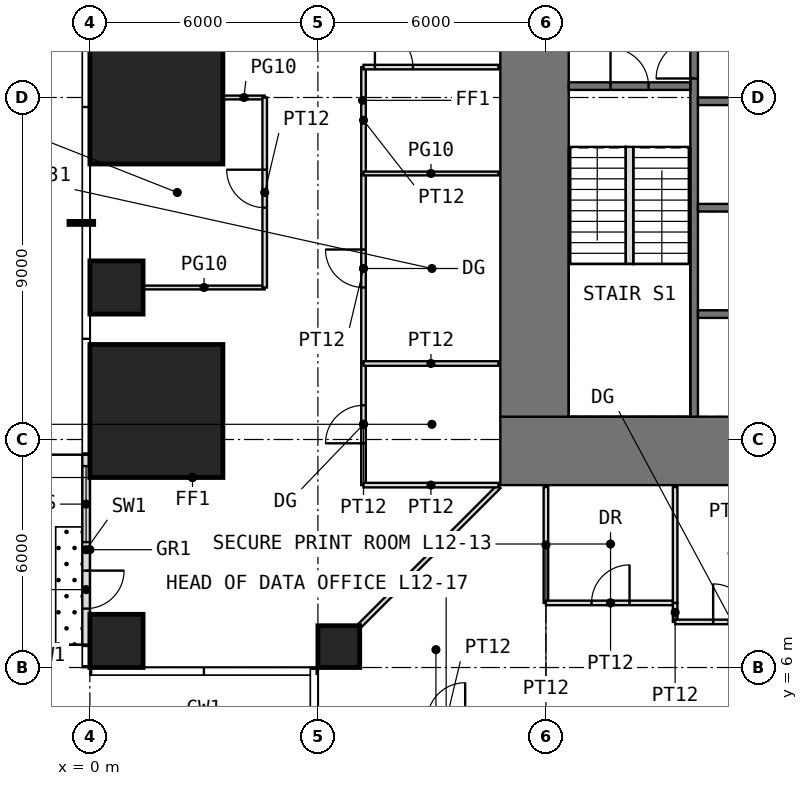
"""IFC4 building model, lengths in metres.
Left out: names, types, materials, properties, quantities, classifications, styles, units other than length and angle.
Written with IfcOpenShell. Run it as: python <this file> out.ifc"""

import sys

from ifc_helpers import new_model, si_unit, direction, frame, frame_2d, origin, origin_2d, place, context, subcontext, project, spatial, rectangle, extrude, element, fill, save


model = new_model("IFC4")
c1 = context("Model", 3, precision=1e-05, world=origin(), true_north=direction((0.0, 1.0)))
c2 = subcontext(c1, "Body", "Model", "MODEL_VIEW")
j1 = project(units=[si_unit("LENGTHUNIT", "METRE"), si_unit("PLANEANGLEUNIT", "RADIAN")], contexts=[c1])
p1 = place(None, origin())
s1 = spatial("IfcSite", under=j1, at=p1, CompositionType="ELEMENT")
p2 = place(p1, origin())
s2 = spatial("IfcBuilding", under=s1, at=p2, CompositionType="ELEMENT")
p3 = place(p2, frame((0.0, 0.0, 54.5)))
s3 = spatial("IfcBuildingStorey", under=s2, at=p3, CompositionType="ELEMENT", Elevation=54.5)
p4 = place(p3, frame((0.7, 6.7, 0.0), z_axis=(0.0, 0.0, 1.0), x_axis=(1.0, 0.0, 0.0)))
e1 = element("IfcColumn", 1, at=p4, inside=s3, PredefinedType="COLUMN", context=c2, shape_type="SweptSolid", body=[
    extrude(rectangle(XDim=1.4, YDim=1.4, at=origin_2d()), origin(), (0.0, 0.0, 1.0), 4.0),
])
p5 = place(p3, frame((6.55, 6.55, 0.0), z_axis=(0.0, 0.0, 1.0), x_axis=(1.0, 0.0, 0.0)))
e2 = element("IfcColumn", 2, at=p5, inside=s3, PredefinedType="COLUMN", context=c2, shape_type="SweptSolid", body=[
    extrude(rectangle(XDim=1.1, YDim=1.1, at=origin_2d()), origin(), (0.0, 0.0, 1.0), 4.0),
])
p6 = place(p3, frame((1.75, 12.75, 0.0), z_axis=(0.0, 0.0, 1.0), x_axis=(1.0, 0.0, 0.0)))
e3 = element("IfcColumn", 3, at=p6, inside=s3, PredefinedType="COLUMN", context=c2, shape_type="SweptSolid", body=[
    extrude(rectangle(XDim=3.5, YDim=3.5, at=origin_2d()), origin(), (0.0, 0.0, 1.0), 4.0),
])
p7 = place(p3, frame((0.7, 16.0, 0.0), z_axis=(0.0, 0.0, 1.0), x_axis=(1.0, 0.0, 0.0)))
e4 = element("IfcColumn", 4, at=p7, inside=s3, PredefinedType="COLUMN", context=c2, shape_type="SweptSolid", body=[
    extrude(rectangle(XDim=1.4, YDim=1.4, at=origin_2d()), origin(), (0.0, 0.0, 1.0), 4.0),
])
p8 = place(p3, frame((1.75, 21.0, 0.0), z_axis=(0.0, 0.0, 1.0), x_axis=(1.0, 0.0, 0.0)))
e5 = element("IfcColumn", 5, at=p8, inside=s3, PredefinedType="COLUMN", context=c2, shape_type="SweptSolid", body=[
    extrude(rectangle(XDim=3.5, YDim=3.5, at=origin_2d()), origin(), (0.0, 0.0, 1.0), 4.0),
])
p9 = place(p3, frame((-0.1, 11.6, 0.0), z_axis=(0.0, 0.0, 1.0), x_axis=(0.0, -1.0, 0.0)))
e6 = element("IfcWall", 6, at=p9, inside=s3, PredefinedType="USERDEFINED", context=c2, shape_type="SweptSolid", body=[
    extrude(rectangle(XDim=5.0, YDim=0.2, at=frame_2d((2.5, 0.0))), origin(), (0.0, 0.0, 1.0), 3.75),
])
p10 = place(p9, frame((3.05, 0.0, 0.0)))
e7 = element("IfcOpeningElement", 7, at=p10, cuts=e6, PredefinedType="OPENING", context=c2, shape_type="SweptSolid", body=[
    extrude(rectangle(XDim=1.0, YDim=2.4, at=frame_2d((0.5, 1.2))), frame((0.0, 0.11, 0.0), z_axis=(0.0, -1.0, 0.0), x_axis=(1.0, 0.0, 0.0)), (0.0, 0.0, 1.0), 0.22),
])
p11 = place(p9, frame((0.3, 0.0, 0.3)))
e8 = element("IfcOpeningElement", 8, at=p11, cuts=e6, PredefinedType="OPENING", context=c2, shape_type="SweptSolid", body=[
    extrude(rectangle(XDim=2.0, YDim=2.7, at=frame_2d((1.0, 1.35))), frame((0.0, 0.11, 0.0), z_axis=(0.0, -1.0, 0.0), x_axis=(1.0, 0.0, 0.0)), (0.0, 0.0, 1.0), 0.22),
])
p12 = place(p3, frame((10.8, 11.7, -0.05), z_axis=(0.0, 0.0, 1.0), x_axis=(1.0, 0.0, 0.0)))
e9 = element("IfcWall", 9, at=p12, inside=s3, PredefinedType="SHEAR", context=c2, shape_type="SweptSolid", body=[
    extrude(rectangle(XDim=20.4, YDim=1.8, at=frame_2d((10.2, 0.0))), origin(), (0.0, 0.0, 1.0), 4.0),
])
p13 = place(p12, frame((9.2, 0.0, 0.05)))
e10 = element("IfcOpeningElement", 10, at=p13, cuts=e9, PredefinedType="OPENING", context=c2, shape_type="SweptSolid", body=[
    extrude(rectangle(XDim=2.0, YDim=2.2, at=frame_2d((1.0, 1.1))), frame((0.0, 0.91, 0.0), z_axis=(0.0, -1.0, 0.0), x_axis=(1.0, 0.0, 0.0)), (0.0, 0.0, 1.0), 1.82),
])
p14 = place(p3, frame((11.7, 12.6, -0.05), z_axis=(0.0, 0.0, 1.0), x_axis=(0.0, 1.0, 0.0)))
e11 = element("IfcWall", 11, at=p14, inside=s3, PredefinedType="SHEAR", context=c2, shape_type="SweptSolid", body=[
    extrude(rectangle(XDim=16.8, YDim=1.8, at=frame_2d((8.4, 0.0))), origin(), (0.0, 0.0, 1.0), 4.0),
])
p15 = place(p14, frame((9.9, 0.0, 0.05)))
e12 = element("IfcOpeningElement", 12, at=p15, cuts=e11, PredefinedType="OPENING", context=c2, shape_type="SweptSolid", body=[
    extrude(rectangle(XDim=1.0, YDim=2.2, at=frame_2d((0.5, 1.1))), frame((0.0, 0.91, 0.0), z_axis=(0.0, -1.0, 0.0), x_axis=(1.0, 0.0, 0.0)), (0.0, 0.0, 1.0), 1.82),
])
p16 = place(p3, frame((15.9, 12.6, -0.05), z_axis=(0.0, 0.0, 1.0), x_axis=(0.0, 1.0, 0.0)))
e13 = element("IfcWall", 13, at=p16, inside=s3, PredefinedType="SHEAR", context=c2, shape_type="SweptSolid", body=[
    extrude(rectangle(XDim=16.8, YDim=0.2, at=frame_2d((8.4, 0.0))), origin(), (0.0, 0.0, 1.0), 4.0),
])
p17 = place(p16, frame((8.9, 0.0, 0.05)))
e14 = element("IfcOpeningElement", 14, at=p17, cuts=e13, PredefinedType="OPENING", context=c2, shape_type="SweptSolid", body=[
    extrude(rectangle(XDim=1.0, YDim=2.2, at=frame_2d((0.5, 1.1))), frame((0.0, 0.11, 0.0), z_axis=(0.0, -1.0, 0.0), x_axis=(1.0, 0.0, 0.0)), (0.0, 0.0, 1.0), 0.22),
])
p18 = place(p3, frame((12.6, 21.3, -0.05), z_axis=(0.0, 0.0, 1.0), x_axis=(1.0, 0.0, 0.0)))
e15 = element("IfcWall", 15, at=p18, inside=s3, PredefinedType="SHEAR", context=c2, shape_type="SweptSolid", body=[
    extrude(rectangle(XDim=3.2, YDim=0.2, at=frame_2d((1.6, 0.0))), origin(), (0.0, 0.0, 1.0), 4.0),
])
p19 = place(p18, frame((1.1, 0.0, 0.05)))
e16 = element("IfcOpeningElement", 16, at=p19, cuts=e15, PredefinedType="OPENING", context=c2, shape_type="SweptSolid", body=[
    extrude(rectangle(XDim=1.0, YDim=2.2, at=frame_2d((0.5, 1.1))), frame((0.0, 0.11, 0.0), z_axis=(0.0, -1.0, 0.0), x_axis=(1.0, 0.0, 0.0)), (0.0, 0.0, 1.0), 0.22),
])
for number, where, z_axis, x_axis in (
    (17, (16.0, 15.3, -0.05), (0.0, 0.0, 1.0), (1.0, 0.0, 0.0)),
    (18, (16.0, 18.1, -0.05), (0.0, 0.0, 1.0), (1.0, 0.0, 0.0)),
    (19, (16.0, 20.9, -0.05), (0.0, 0.0, 1.0), (1.0, 0.0, 0.0)),
):
    element("IfcWall", number, at=place(p3, frame(where, z_axis=z_axis, x_axis=x_axis)), inside=s3, PredefinedType="SHEAR", context=c2, shape_type="SweptSolid", body=[
        extrude(rectangle(XDim=3.2, YDim=0.2, at=frame_2d((1.6, 0.0))), origin(), (0.0, 0.0, 1.0), 4.0),
    ])
p20 = place(p3, frame((1.41, 16.0, 0.0), z_axis=(0.0, 0.0, 1.0), x_axis=(1.0, 0.0, 0.0)))
e20 = element("IfcWall", 20, at=p20, inside=s3, PredefinedType="PARTITIONING", context=c2, shape_type="SweptSolid", body=[
    extrude(rectangle(XDim=3.19, YDim=0.1, at=frame_2d((1.595, 0.0))), origin(), (0.0, 0.0, 1.0), 3.75),
])
p21 = place(p3, frame((3.51, 21.0, 0.0), z_axis=(0.0, 0.0, 1.0), x_axis=(1.0, 0.0, 0.0)))
e21 = element("IfcWall", 21, at=p21, inside=s3, PredefinedType="PARTITIONING", context=c2, shape_type="SweptSolid", body=[
    extrude(rectangle(XDim=1.09, YDim=0.1, at=frame_2d((0.545, 0.0))), origin(), (0.0, 0.0, 1.0), 3.75),
])
p22 = place(p3, frame((4.6, 16.0, 0.0), z_axis=(0.0, 0.0, 1.0), x_axis=(0.0, 1.0, 0.0)))
e22 = element("IfcWall", 22, at=p22, inside=s3, PredefinedType="PARTITIONING", context=c2, shape_type="SweptSolid", body=[
    extrude(rectangle(XDim=5.0, YDim=0.12, at=frame_2d((2.5, 0.0))), origin(), (0.0, 0.0, 1.0), 3.75),
])
p23 = place(p22, frame((2.1, 0.0, 0.0)))
e23 = element("IfcOpeningElement", 23, at=p23, cuts=e22, PredefinedType="OPENING", context=c2, shape_type="SweptSolid", body=[
    extrude(rectangle(XDim=1.0, YDim=2.4, at=frame_2d((0.5, 1.2))), frame((0.0, 0.07, 0.0), z_axis=(0.0, -1.0, 0.0), x_axis=(1.0, 0.0, 0.0)), (0.0, 0.0, 1.0), 0.14),
])
p24 = place(p3, frame((7.11, 7.11, 0.0), z_axis=(0.0, 0.0, 1.0), x_axis=(0.707106781187, 0.707106781187, 0.0)))
e24 = element("IfcWall", 24, at=p24, inside=s3, PredefinedType="PARTITIONING", context=c2, shape_type="SweptSolid", body=[
    extrude(rectangle(XDim=5.168, YDim=0.12, at=frame_2d((2.584, 0.0))), origin(), (0.0, 0.0, 1.0), 3.75),
])
p25 = place(p3, frame((7.2, 10.8, 0.0), z_axis=(0.0, 0.0, 1.0), x_axis=(0.0, 1.0, 0.0)))
e25 = element("IfcWall", 25, at=p25, inside=s3, PredefinedType="PARTITIONING", context=c2, shape_type="SweptSolid", body=[
    extrude(rectangle(XDim=3.2, YDim=0.12, at=frame_2d((1.6, 0.0))), origin(), (0.0, 0.0, 1.0), 3.75),
])
p26 = place(p25, frame((1.1, 0.0, 0.0)))
e26 = element("IfcOpeningElement", 26, at=p26, cuts=e25, PredefinedType="OPENING", context=c2, shape_type="SweptSolid", body=[
    extrude(rectangle(XDim=1.0, YDim=2.4, at=frame_2d((0.5, 1.2))), frame((0.0, 0.07, 0.0), z_axis=(0.0, -1.0, 0.0), x_axis=(1.0, 0.0, 0.0)), (0.0, 0.0, 1.0), 0.14),
])
p27 = place(p3, frame((7.2, 10.8, 0.0), z_axis=(0.0, 0.0, 1.0), x_axis=(1.0, 0.0, 0.0)))
e27 = element("IfcWall", 27, at=p27, inside=s3, PredefinedType="PARTITIONING", context=c2, shape_type="SweptSolid", body=[
    extrude(rectangle(XDim=3.55, YDim=0.12, at=frame_2d((1.775, 0.0))), origin(), (0.0, 0.0, 1.0), 3.75),
])
p28 = place(p3, frame((7.2, 14.0, 0.0), z_axis=(0.0, 0.0, 1.0), x_axis=(0.0, 1.0, 0.0)))
e28 = element("IfcWall", 28, at=p28, inside=s3, PredefinedType="PARTITIONING", context=c2, shape_type="SweptSolid", body=[
    extrude(rectangle(XDim=5.0, YDim=0.12, at=frame_2d((2.5, 0.0))), origin(), (0.0, 0.0, 1.0), 3.75),
])
p29 = place(p28, frame((2.0, 0.0, 0.0)))
e29 = element("IfcOpeningElement", 29, at=p29, cuts=e28, PredefinedType="OPENING", context=c2, shape_type="SweptSolid", body=[
    extrude(rectangle(XDim=1.0, YDim=2.4, at=frame_2d((0.5, 1.2))), frame((0.0, 0.07, 0.0), z_axis=(0.0, -1.0, 0.0), x_axis=(1.0, 0.0, 0.0)), (0.0, 0.0, 1.0), 0.14),
])
p30 = place(p3, frame((7.2, 14.0, 0.0), z_axis=(0.0, 0.0, 1.0), x_axis=(1.0, 0.0, 0.0)))
e30 = element("IfcWall", 30, at=p30, inside=s3, PredefinedType="PARTITIONING", context=c2, shape_type="SweptSolid", body=[
    extrude(rectangle(XDim=3.55, YDim=0.12, at=frame_2d((1.775, 0.0))), origin(), (0.0, 0.0, 1.0), 3.75),
])
p31 = place(p3, frame((7.2, 19.0, 0.0), z_axis=(0.0, 0.0, 1.0), x_axis=(0.0, 1.0, 0.0)))
e31 = element("IfcWall", 31, at=p31, inside=s3, PredefinedType="PARTITIONING", context=c2, shape_type="SweptSolid", body=[
    extrude(rectangle(XDim=2.8, YDim=0.12, at=frame_2d((1.4, 0.0))), origin(), (0.0, 0.0, 1.0), 3.75),
])
p32 = place(p3, frame((7.2, 19.0, 0.0), z_axis=(0.0, 0.0, 1.0), x_axis=(1.0, 0.0, 0.0)))
e32 = element("IfcWall", 32, at=p32, inside=s3, PredefinedType="PARTITIONING", context=c2, shape_type="SweptSolid", body=[
    extrude(rectangle(XDim=3.55, YDim=0.1, at=frame_2d((1.775, 0.0))), origin(), (0.0, 0.0, 1.0), 3.75),
])
p33 = place(p3, frame((7.2, 21.8, 0.0), z_axis=(0.0, 0.0, 1.0), x_axis=(1.0, 0.0, 0.0)))
e33 = element("IfcWall", 33, at=p33, inside=s3, PredefinedType="PARTITIONING", context=c2, shape_type="SweptSolid", body=[
    extrude(rectangle(XDim=3.55, YDim=0.12, at=frame_2d((1.775, 0.0))), origin(), (0.0, 0.0, 1.0), 3.75),
])
p34 = place(p33, frame((0.3, 0.0, 0.0)))
e34 = element("IfcOpeningElement", 34, at=p34, cuts=e33, PredefinedType="OPENING", context=c2, shape_type="SweptSolid", body=[
    extrude(rectangle(XDim=1.0, YDim=2.4, at=frame_2d((0.5, 1.2))), frame((0.0, 0.07, 0.0), z_axis=(0.0, -1.0, 0.0), x_axis=(1.0, 0.0, 0.0)), (0.0, 0.0, 1.0), 0.14),
])
p35 = place(p3, frame((12.0, 7.7, 0.0), z_axis=(0.0, 0.0, 1.0), x_axis=(0.0, 1.0, 0.0)))
e35 = element("IfcWall", 35, at=p35, inside=s3, PredefinedType="PARTITIONING", context=c2, shape_type="SweptSolid", body=[
    extrude(rectangle(XDim=3.05, YDim=0.12, at=frame_2d((1.525, 0.0))), origin(), (0.0, 0.0, 1.0), 3.75),
])
p36 = place(p3, frame((12.0, 7.7, 0.0), z_axis=(0.0, 0.0, 1.0), x_axis=(1.0, 0.0, 0.0)))
e36 = element("IfcWall", 36, at=p36, inside=s3, PredefinedType="PARTITIONING", context=c2, shape_type="SweptSolid", body=[
    extrude(rectangle(XDim=3.4, YDim=0.12, at=frame_2d((1.7, 0.0))), origin(), (0.0, 0.0, 1.0), 3.75),
])
p37 = place(p36, frame((1.2, 0.0, 0.0)))
e37 = element("IfcOpeningElement", 37, at=p37, cuts=e36, PredefinedType="OPENING", context=c2, shape_type="SweptSolid", body=[
    extrude(rectangle(XDim=1.0, YDim=2.2, at=frame_2d((0.5, 1.1))), frame((0.0, 0.07, 0.0), z_axis=(0.0, -1.0, 0.0), x_axis=(1.0, 0.0, 0.0)), (0.0, 0.0, 1.0), 0.14),
])
p38 = place(p3, frame((15.4, 7.2, 0.0), z_axis=(0.0, 0.0, 1.0), x_axis=(0.0, 1.0, 0.0)))
e38 = element("IfcWall", 38, at=p38, inside=s3, PredefinedType="PARTITIONING", context=c2, shape_type="SweptSolid", body=[
    extrude(rectangle(XDim=0.5, YDim=0.12, at=frame_2d((0.25, 0.0))), origin(), (0.0, 0.0, 1.0), 3.75),
])
p39 = place(p3, frame((15.4, 7.2, 0.0), z_axis=(0.0, 0.0, 1.0), x_axis=(1.0, 0.0, 0.0)))
e39 = element("IfcWall", 39, at=p39, inside=s3, PredefinedType="PARTITIONING", context=c2, shape_type="SweptSolid", body=[
    extrude(rectangle(XDim=3.0, YDim=0.12, at=frame_2d((1.5, 0.0))), origin(), (0.0, 0.0, 1.0), 3.75),
])
p40 = place(p39, frame((1.0, 0.0, 0.0)))
e40 = element("IfcOpeningElement", 40, at=p40, cuts=e39, PredefinedType="OPENING", context=c2, shape_type="SweptSolid", body=[
    extrude(rectangle(XDim=1.0, YDim=2.4, at=frame_2d((0.5, 1.2))), frame((0.0, 0.07, 0.0), z_axis=(0.0, -1.0, 0.0), x_axis=(1.0, 0.0, 0.0)), (0.0, 0.0, 1.0), 0.14),
])
p41 = place(p3, frame((15.4, 7.7, 0.0), z_axis=(0.0, 0.0, 1.0), x_axis=(0.0, 1.0, 0.0)))
e41 = element("IfcWall", 41, at=p41, inside=s3, PredefinedType="PARTITIONING", context=c2, shape_type="SweptSolid", body=[
    extrude(rectangle(XDim=3.05, YDim=0.12, at=frame_2d((1.525, 0.0))), origin(), (0.0, 0.0, 1.0), 3.75),
])
p42 = place(p3, frame((14.2, 16.62, 0.0), z_axis=(0.0, 0.0, 1.0), x_axis=(0.0, 1.0, 0.0)))
e42 = element("IfcWall", 42, at=p42, inside=s3, PredefinedType="PARTITIONING", context=c2, shape_type="SweptSolid", body=[
    extrude(rectangle(XDim=3.08, YDim=0.2, at=frame_2d((1.54, 0.0))), origin(), (0.0, 0.0, 1.0), 4.0),
])
p43 = place(p10, origin())
e43 = element("IfcDoor", 43, at=p43, inside=s3, OperationType="SINGLE_SWING_LEFT", PredefinedType="DOOR", context=c2, shape_type="SweptSolid", body=[
    extrude(rectangle(XDim=1.0, YDim=2.4, at=frame_2d((0.5, 1.2))), frame((0.0, 0.025, 0.0), z_axis=(0.0, -1.0, 0.0), x_axis=(1.0, 0.0, 0.0)), (0.0, 0.0, 1.0), 0.05),
])
fill(e7, e43)
p44 = place(p11, origin())
e44 = element("IfcWindow", 44, at=p44, inside=s3, PartitioningType="SINGLE_PANEL", PredefinedType="WINDOW", context=c2, shape_type="SweptSolid", body=[
    extrude(rectangle(XDim=2.0, YDim=2.7, at=frame_2d((1.0, 1.35))), frame((0.0, 0.03, 0.0), z_axis=(0.0, -1.0, 0.0), x_axis=(1.0, 0.0, 0.0)), (0.0, 0.0, 1.0), 0.06),
])
fill(e8, e44)
p45 = place(p19, origin())
e45 = element("IfcDoor", 45, at=p45, inside=s3, OperationType="SINGLE_SWING_LEFT", PredefinedType="DOOR", context=c2, shape_type="SweptSolid", body=[
    extrude(rectangle(XDim=1.0, YDim=2.2, at=frame_2d((0.5, 1.1))), frame((0.0, 0.025, 0.0), z_axis=(0.0, -1.0, 0.0), x_axis=(1.0, 0.0, 0.0)), (0.0, 0.0, 1.0), 0.05),
])
fill(e16, e45)
p46 = place(p17, origin())
e46 = element("IfcDoor", 46, at=p46, inside=s3, OperationType="SINGLE_SWING_LEFT", PredefinedType="DOOR", context=c2, shape_type="SweptSolid", body=[
    extrude(rectangle(XDim=1.0, YDim=2.2, at=frame_2d((0.5, 1.1))), frame((0.0, 0.025, 0.0), z_axis=(0.0, -1.0, 0.0), x_axis=(1.0, 0.0, 0.0)), (0.0, 0.0, 1.0), 0.05),
])
fill(e14, e46)
p47 = place(p37, origin())
e47 = element("IfcDoor", 47, at=p47, inside=s3, OperationType="SINGLE_SWING_RIGHT", PredefinedType="DOOR", context=c2, shape_type="SweptSolid", body=[
    extrude(rectangle(XDim=1.0, YDim=2.2, at=frame_2d((0.5, 1.1))), frame((0.0, 0.025, 0.0), z_axis=(0.0, -1.0, 0.0), x_axis=(1.0, 0.0, 0.0)), (0.0, 0.0, 1.0), 0.05),
])
fill(e37, e47)
p48 = place(p40, origin())
e48 = element("IfcDoor", 48, at=p48, inside=s3, OperationType="SINGLE_SWING_LEFT", PredefinedType="DOOR", context=c2, shape_type="SweptSolid", body=[
    extrude(rectangle(XDim=1.0, YDim=2.4, at=frame_2d((0.5, 1.2))), frame((0.0, 0.025, 0.0), z_axis=(0.0, -1.0, 0.0), x_axis=(1.0, 0.0, 0.0)), (0.0, 0.0, 1.0), 0.05),
])
fill(e40, e48)
p49 = place(p26, origin())
e49 = element("IfcDoor", 49, at=p49, inside=s3, OperationType="SINGLE_SWING_LEFT", PredefinedType="DOOR", context=c2, shape_type="SweptSolid", body=[
    extrude(rectangle(XDim=1.0, YDim=2.4, at=frame_2d((0.5, 1.2))), frame((0.0, 0.025, 0.0), z_axis=(0.0, -1.0, 0.0), x_axis=(1.0, 0.0, 0.0)), (0.0, 0.0, 1.0), 0.05),
])
fill(e26, e49)
p50 = place(p29, origin())
e50 = element("IfcDoor", 50, at=p50, inside=s3, OperationType="SINGLE_SWING_RIGHT", PredefinedType="DOOR", context=c2, shape_type="SweptSolid", body=[
    extrude(rectangle(XDim=1.0, YDim=2.4, at=frame_2d((0.5, 1.2))), frame((0.0, 0.025, 0.0), z_axis=(0.0, -1.0, 0.0), x_axis=(1.0, 0.0, 0.0)), (0.0, 0.0, 1.0), 0.05),
])
fill(e29, e50)
p51 = place(p23, origin())
e51 = element("IfcDoor", 51, at=p51, inside=s3, OperationType="SINGLE_SWING_RIGHT", PredefinedType="DOOR", context=c2, shape_type="SweptSolid", body=[
    extrude(rectangle(XDim=1.0, YDim=2.4, at=frame_2d((0.5, 1.2))), frame((0.0, 0.025, 0.0), z_axis=(0.0, -1.0, 0.0), x_axis=(1.0, 0.0, 0.0)), (0.0, 0.0, 1.0), 0.05),
])
fill(e23, e51)
p52 = place(p34, origin())
e52 = element("IfcDoor", 52, at=p52, inside=s3, OperationType="SINGLE_SWING_LEFT", PredefinedType="DOOR", context=c2, shape_type="SweptSolid", body=[
    extrude(rectangle(XDim=1.0, YDim=2.4, at=frame_2d((0.5, 1.2))), frame((0.0, 0.025, 0.0), z_axis=(0.0, -1.0, 0.0), x_axis=(1.0, 0.0, 0.0)), (0.0, 0.0, 1.0), 0.05),
])
fill(e34, e52)
save(model, sys.argv[1])
